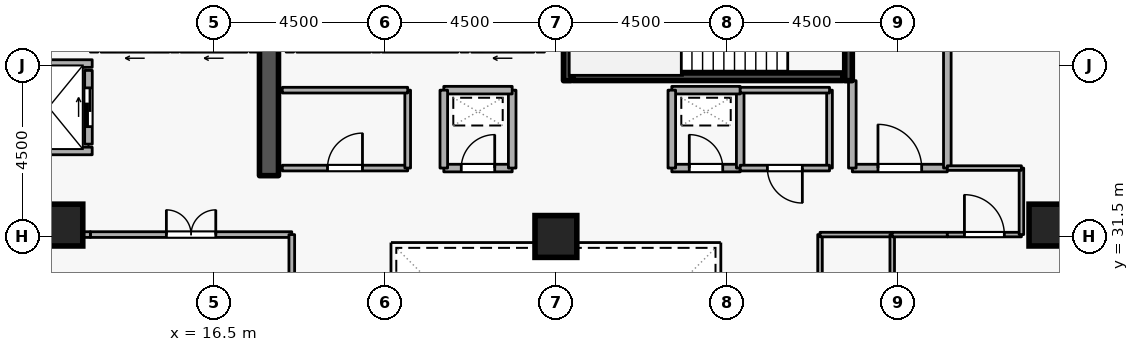
"""IFC4 building model, lengths in metres.
Left out: names, types, materials, properties, quantities, classifications, styles, units other than length and angle.
Written with IfcOpenShell. Run it as: python <this file> out.ifc"""

import sys

from ifc_helpers import new_model, si_unit, direction, frame, frame_2d, origin, origin_2d, place, context, subcontext, project, spatial, rectangle, extrude, element, fill, save


model = new_model("IFC4")
c1 = context("Model", 3, precision=1e-05, world=origin(), true_north=direction((0.0, 1.0)))
c2 = subcontext(c1, "Body", "Model", "MODEL_VIEW")
j1 = project(units=[si_unit("LENGTHUNIT", "METRE"), si_unit("PLANEANGLEUNIT", "RADIAN")], contexts=[c1])
p1 = place(None, origin())
s1 = spatial("IfcSite", under=j1, at=p1, CompositionType="ELEMENT")
p2 = place(p1, origin())
s2 = spatial("IfcBuilding", under=s1, at=p2, CompositionType="ELEMENT")
p3 = place(p2, frame((0.0, 0.0, 145.5)))
s3 = spatial("IfcBuildingStorey", under=s2, at=p3, CompositionType="ELEMENT", Elevation=145.5)
p4 = place(p3, frame((17.95, 33.1, 0.0), z_axis=(0.0, 0.0, 1.0), x_axis=(0.0, 1.0, 0.0)))
e1 = element("IfcWall", 1, at=p4, inside=s3, PredefinedType="SHEAR", context=c2, shape_type="SweptSolid", body=[
    extrude(rectangle(XDim=5.8, YDim=0.5, at=frame_2d((2.9, 0.0))), origin(), (0.0, 0.0, 1.0), 3.6),
])
for number, where, z_axis, x_axis in (
    (2, (12.5, 31.8, 0.0), (0.0, 0.0, 1.0), (1.0, 0.0, 0.0)),
    (3, (38.5, 31.8, 0.0), (0.0, 0.0, 1.0), (1.0, 0.0, 0.0)),
    (4, (25.5, 31.5, 0.0), (0.0, 0.0, 1.0), (1.0, 0.0, 0.0)),
):
    element("IfcColumn", number, at=place(p3, frame(where, z_axis=z_axis, x_axis=x_axis)), inside=s3, PredefinedType="COLUMN", context=c2, shape_type="SweptSolid", body=[
        extrude(rectangle(XDim=1.1, YDim=1.1, at=origin_2d()), origin(), (0.0, 0.0, 1.0), 3.6),
    ])
p5 = place(p3, frame((24.92, 36.45, 0.0), z_axis=(0.0, 0.0, 1.0), x_axis=(-1.0, 0.0, 0.0)))
e5 = element("IfcWall", 5, at=p5, inside=s3, PredefinedType="STANDARD", context=c2, shape_type="SweptSolid", body=[
    extrude(rectangle(XDim=1.64, YDim=0.2, at=frame_2d((0.82, 0.0))), origin(), (0.0, 0.0, 1.0), 3.3),
])
p6 = place(p5, frame((0.31, 0.0, 0.0)))
e6 = element("IfcOpeningElement", 6, at=p6, cuts=e5, PredefinedType="OPENING", context=c2, shape_type="SweptSolid", body=[
    extrude(rectangle(XDim=1.02, YDim=2.06, at=frame_2d((0.51, 1.03))), frame((0.0, 0.11, 0.0), z_axis=(0.0, -1.0, 0.0), x_axis=(1.0, 0.0, 0.0)), (0.0, 0.0, 1.0), 0.22),
])
p7 = place(p3, frame((22.92, 36.45, 0.0), z_axis=(0.0, 0.0, 1.0), x_axis=(-1.0, 0.0, 0.0)))
e7 = element("IfcWall", 7, at=p7, inside=s3, PredefinedType="STANDARD", context=c2, shape_type="SweptSolid", body=[
    extrude(rectangle(XDim=1.99, YDim=0.2, at=frame_2d((0.995, 0.0))), origin(), (0.0, 0.0, 1.0), 3.3),
])
p8 = place(p3, frame((20.62, 36.45, 0.0), z_axis=(0.0, 0.0, 1.0), x_axis=(-1.0, 0.0, 0.0)))
e8 = element("IfcWall", 8, at=p8, inside=s3, PredefinedType="STANDARD", context=c2, shape_type="SweptSolid", body=[
    extrude(rectangle(XDim=1.94, YDim=0.2, at=frame_2d((0.97, 0.0))), origin(), (0.0, 0.0, 1.0), 3.3),
])
p9 = place(p3, frame((17.37, 36.45, 0.0), z_axis=(0.0, 0.0, 1.0), x_axis=(-1.0, 0.0, 0.0)))
e9 = element("IfcWall", 9, at=p9, inside=s3, PredefinedType="STANDARD", context=c2, shape_type="SweptSolid", body=[
    extrude(rectangle(XDim=1.74, YDim=0.2, at=frame_2d((0.87, 0.0))), origin(), (0.0, 0.0, 1.0), 3.3),
])
p10 = place(p9, frame((0.36, 0.0, 0.0)))
e10 = element("IfcOpeningElement", 10, at=p10, cuts=e9, PredefinedType="OPENING", context=c2, shape_type="SweptSolid", body=[
    extrude(rectangle(XDim=1.02, YDim=2.06, at=frame_2d((0.51, 1.03))), frame((0.0, 0.11, 0.0), z_axis=(0.0, -1.0, 0.0), x_axis=(1.0, 0.0, 0.0)), (0.0, 0.0, 1.0), 0.22),
])
p11 = place(p3, frame((15.32, 36.45, 0.0), z_axis=(0.0, 0.0, 1.0), x_axis=(-1.0, 0.0, 0.0)))
e11 = element("IfcWall", 11, at=p11, inside=s3, PredefinedType="STANDARD", context=c2, shape_type="SweptSolid", body=[
    extrude(rectangle(XDim=1.79, YDim=0.2, at=frame_2d((0.895, 0.0))), origin(), (0.0, 0.0, 1.0), 3.3),
])
p12 = place(p11, frame((0.385, 0.0, 0.0)))
e12 = element("IfcOpeningElement", 12, at=p12, cuts=e11, PredefinedType="OPENING", context=c2, shape_type="SweptSolid", body=[
    extrude(rectangle(XDim=1.02, YDim=2.06, at=frame_2d((0.51, 1.03))), frame((0.0, 0.11, 0.0), z_axis=(0.0, -1.0, 0.0), x_axis=(1.0, 0.0, 0.0)), (0.0, 0.0, 1.0), 0.22),
])
p13 = place(p3, frame((13.2, 33.93, 0.0), z_axis=(0.0, 0.0, 1.0), x_axis=(0.0, 1.0, 0.0)))
e13 = element("IfcWall", 13, at=p13, inside=s3, PredefinedType="STANDARD", context=c2, shape_type="SweptSolid", body=[
    extrude(rectangle(XDim=1.94, YDim=0.2, at=frame_2d((0.97, 0.0))), origin(), (0.0, 0.0, 1.0), 3.3),
])
p14 = place(p13, frame((0.46, 0.0, 0.0)))
e14 = element("IfcOpeningElement", 14, at=p14, cuts=e13, PredefinedType="OPENING", context=c2, shape_type="SweptSolid", body=[
    extrude(rectangle(XDim=1.02, YDim=2.06, at=frame_2d((0.51, 1.03))), frame((0.0, 0.11, 0.0), z_axis=(0.0, -1.0, 0.0), x_axis=(1.0, 0.0, 0.0)), (0.0, 0.0, 1.0), 0.22),
])
for number, where, z_axis, x_axis in (
    (15, (11.002, 36.05, 0.0), (0.0, 0.0, 1.0), (1.0, 0.0, 0.0)),
    (16, (11.002, 33.75, 0.0), (0.0, 0.0, 1.0), (1.0, 0.0, 0.0)),
):
    element("IfcWall", number, at=place(p3, frame(where, z_axis=z_axis, x_axis=x_axis)), inside=s3, PredefinedType="STANDARD", context=c2, shape_type="SweptSolid", body=[
        extrude(rectangle(XDim=2.296, YDim=0.2, at=frame_2d((1.148, 0.0))), origin(), (0.0, 0.0, 1.0), 3.3),
    ])
p15 = place(p3, frame((33.2, 38.95, 0.0), z_axis=(0.0, 0.0, 1.0), x_axis=(0.0, -1.0, 0.0)))
e17 = element("IfcWall", 17, at=p15, inside=s3, PredefinedType="SHEAR", context=c2, shape_type="SweptSolid", body=[
    extrude(rectangle(XDim=3.35, YDim=0.2, at=frame_2d((1.675, 0.0))), origin(), (0.0, 0.0, 1.0), 3.6),
])
p16 = place(p15, frame((1.125, 0.0, 0.0)))
e18 = element("IfcOpeningElement", 18, at=p16, cuts=e17, PredefinedType="OPENING", context=c2, shape_type="SweptSolid", body=[
    extrude(rectangle(XDim=1.1, YDim=2.1, at=frame_2d((0.55, 1.05))), frame((0.0, 0.11, 0.0), z_axis=(0.0, -1.0, 0.0), x_axis=(1.0, 0.0, 0.0)), (0.0, 0.0, 1.0), 0.22),
])
p17 = place(p3, frame((25.8, 35.6, 0.0), z_axis=(0.0, 0.0, 1.0), x_axis=(0.0, 1.0, 0.0)))
e19 = element("IfcWall", 19, at=p17, inside=s3, PredefinedType="SHEAR", context=c2, shape_type="SweptSolid", body=[
    extrude(rectangle(XDim=3.35, YDim=0.2, at=frame_2d((1.675, 0.0))), origin(), (0.0, 0.0, 1.0), 3.6),
])
p18 = place(p3, frame((25.95, 35.703, 0.0), z_axis=(0.0, 0.0, 1.0), x_axis=(1.0, 0.0, 0.0)))
e20 = element("IfcWall", 20, at=p18, inside=s3, PredefinedType="SHEAR", context=c2, shape_type="SweptSolid", body=[
    extrude(rectangle(XDim=7.1, YDim=0.2, at=frame_2d((3.55, 0.0))), origin(), (0.0, 0.0, 1.0), 3.6),
])
p19 = place(p3, frame((33.3, 33.3, 0.0), z_axis=(0.0, 0.0, 1.0), x_axis=(1.0, 0.0, 0.0)))
e21 = element("IfcWall", 21, at=p19, inside=s3, PredefinedType="STANDARD", context=c2, shape_type="SweptSolid", body=[
    extrude(rectangle(XDim=2.5, YDim=0.2, at=frame_2d((1.25, 0.0))), origin(), (0.0, 0.0, 1.0), 3.3),
])
p20 = place(p19, frame((0.675, 0.0, 0.0)))
e22 = element("IfcOpeningElement", 22, at=p20, cuts=e21, PredefinedType="OPENING", context=c2, shape_type="SweptSolid", body=[
    extrude(rectangle(XDim=1.15, YDim=2.1, at=frame_2d((0.575, 1.05))), frame((0.0, 0.11, 0.0), z_axis=(0.0, -1.0, 0.0), x_axis=(1.0, 0.0, 0.0)), (0.0, 0.0, 1.0), 0.22),
])
p21 = place(p3, frame((35.8, 33.3, 0.0), z_axis=(0.0, 0.0, 1.0), x_axis=(0.0, 1.0, 0.0)))
e23 = element("IfcWall", 23, at=p21, inside=s3, PredefinedType="STANDARD", context=c2, shape_type="SweptSolid", body=[
    extrude(rectangle(XDim=5.7, YDim=0.2, at=frame_2d((2.85, 0.0))), origin(), (0.0, 0.0, 1.0), 3.3),
])
p22 = place(p3, frame((33.3, 35.6, 0.0), z_axis=(0.0, 0.0, 1.0), x_axis=(0.0, -1.0, 0.0)))
e24 = element("IfcWall", 24, at=p22, inside=s3, PredefinedType="STANDARD", context=c2, shape_type="SweptSolid", body=[
    extrude(rectangle(XDim=2.3, YDim=0.2, at=frame_2d((1.15, 0.0))), origin(), (0.0, 0.0, 1.0), 2.505),
])
p23 = place(p3, frame((22.55, 33.3, 0.0), z_axis=(0.0, 0.0, 1.0), x_axis=(1.0, 0.0, 0.0)))
e25 = element("IfcWall", 25, at=p23, inside=s3, PredefinedType="STANDARD", context=c2, shape_type="SweptSolid", body=[
    extrude(rectangle(XDim=1.8, YDim=0.2, at=frame_2d((0.9, 0.0))), origin(), (0.0, 0.0, 1.0), 3.3),
])
p24 = place(p23, frame((0.46, 0.0, 0.0)))
e26 = element("IfcOpeningElement", 26, at=p24, cuts=e25, PredefinedType="OPENING", context=c2, shape_type="SweptSolid", body=[
    extrude(rectangle(XDim=0.88, YDim=2.04, at=frame_2d((0.44, 1.02))), frame((0.0, 0.11, 0.0), z_axis=(0.0, -1.0, 0.0), x_axis=(1.0, 0.0, 0.0)), (0.0, 0.0, 1.0), 0.22),
])
p25 = place(p3, frame((24.35, 33.3, 0.0), z_axis=(0.0, 0.0, 1.0), x_axis=(0.0, 1.0, 0.0)))
e27 = element("IfcWall", 27, at=p25, inside=s3, PredefinedType="STANDARD", context=c2, shape_type="SweptSolid", body=[
    extrude(rectangle(XDim=2.05, YDim=0.2, at=frame_2d((1.025, 0.0))), origin(), (0.0, 0.0, 1.0), 3.3),
])
p26 = place(p3, frame((24.35, 35.35, 0.0), z_axis=(0.0, 0.0, 1.0), x_axis=(-1.0, 0.0, 0.0)))
e28 = element("IfcWall", 28, at=p26, inside=s3, PredefinedType="STANDARD", context=c2, shape_type="SweptSolid", body=[
    extrude(rectangle(XDim=1.8, YDim=0.2, at=frame_2d((0.9, 0.0))), origin(), (0.0, 0.0, 1.0), 3.3),
])
p27 = place(p3, frame((22.55, 35.35, 0.0), z_axis=(0.0, 0.0, 1.0), x_axis=(0.0, -1.0, 0.0)))
e29 = element("IfcWall", 29, at=p27, inside=s3, PredefinedType="STANDARD", context=c2, shape_type="SweptSolid", body=[
    extrude(rectangle(XDim=2.05, YDim=0.2, at=frame_2d((1.025, 0.0))), origin(), (0.0, 0.0, 1.0), 3.3),
])
p28 = place(p3, frame((28.55, 33.3, 0.0), z_axis=(0.0, 0.0, 1.0), x_axis=(1.0, 0.0, 0.0)))
e30 = element("IfcWall", 30, at=p28, inside=s3, PredefinedType="STANDARD", context=c2, shape_type="SweptSolid", body=[
    extrude(rectangle(XDim=1.8, YDim=0.2, at=frame_2d((0.9, 0.0))), origin(), (0.0, 0.0, 1.0), 3.3),
])
p29 = place(p28, frame((0.46, 0.0, 0.0)))
e31 = element("IfcOpeningElement", 31, at=p29, cuts=e30, PredefinedType="OPENING", context=c2, shape_type="SweptSolid", body=[
    extrude(rectangle(XDim=0.88, YDim=2.04, at=frame_2d((0.44, 1.02))), frame((0.0, 0.11, 0.0), z_axis=(0.0, -1.0, 0.0), x_axis=(1.0, 0.0, 0.0)), (0.0, 0.0, 1.0), 0.22),
])
p30 = place(p3, frame((30.35, 33.3, 0.0), z_axis=(0.0, 0.0, 1.0), x_axis=(0.0, 1.0, 0.0)))
e32 = element("IfcWall", 32, at=p30, inside=s3, PredefinedType="STANDARD", context=c2, shape_type="SweptSolid", body=[
    extrude(rectangle(XDim=2.05, YDim=0.2, at=frame_2d((1.025, 0.0))), origin(), (0.0, 0.0, 1.0), 3.3),
])
p31 = place(p3, frame((30.35, 35.35, 0.0), z_axis=(0.0, 0.0, 1.0), x_axis=(-1.0, 0.0, 0.0)))
e33 = element("IfcWall", 33, at=p31, inside=s3, PredefinedType="STANDARD", context=c2, shape_type="SweptSolid", body=[
    extrude(rectangle(XDim=1.8, YDim=0.2, at=frame_2d((0.9, 0.0))), origin(), (0.0, 0.0, 1.0), 3.3),
])
p32 = place(p3, frame((28.55, 35.35, 0.0), z_axis=(0.0, 0.0, 1.0), x_axis=(0.0, -1.0, 0.0)))
e34 = element("IfcWall", 34, at=p32, inside=s3, PredefinedType="STANDARD", context=c2, shape_type="SweptSolid", body=[
    extrude(rectangle(XDim=2.05, YDim=0.2, at=frame_2d((1.025, 0.0))), origin(), (0.0, 0.0, 1.0), 3.3),
])
p33 = place(p3, frame((18.3, 33.3, 0.0), z_axis=(0.0, 0.0, 1.0), x_axis=(1.0, 0.0, 0.0)))
e35 = element("IfcWall", 35, at=p33, inside=s3, PredefinedType="PARTITIONING", context=c2, shape_type="SweptSolid", body=[
    extrude(rectangle(XDim=3.3, YDim=0.15, at=frame_2d((1.65, 0.0))), origin(), (0.0, 0.0, 1.0), 3.3),
])
p34 = place(p33, frame((1.19, 0.0, 0.0)))
e36 = element("IfcOpeningElement", 36, at=p34, cuts=e35, PredefinedType="OPENING", context=c2, shape_type="SweptSolid", body=[
    extrude(rectangle(XDim=0.92, YDim=2.08, at=frame_2d((0.46, 1.04))), frame((0.0, 0.085, 0.0), z_axis=(0.0, -1.0, 0.0), x_axis=(1.0, 0.0, 0.0)), (0.0, 0.0, 1.0), 0.17),
])
p35 = place(p3, frame((21.6, 33.3, 0.0), z_axis=(0.0, 0.0, 1.0), x_axis=(0.0, 1.0, 0.0)))
e37 = element("IfcWall", 37, at=p35, inside=s3, PredefinedType="PARTITIONING", context=c2, shape_type="SweptSolid", body=[
    extrude(rectangle(XDim=2.05, YDim=0.15, at=frame_2d((1.025, 0.0))), origin(), (0.0, 0.0, 1.0), 3.3),
])
p36 = place(p3, frame((21.6, 35.35, 0.0), z_axis=(0.0, 0.0, 1.0), x_axis=(-1.0, 0.0, 0.0)))
e38 = element("IfcWall", 38, at=p36, inside=s3, PredefinedType="PARTITIONING", context=c2, shape_type="SweptSolid", body=[
    extrude(rectangle(XDim=3.3, YDim=0.15, at=frame_2d((1.65, 0.0))), origin(), (0.0, 0.0, 1.0), 3.3),
])
p37 = place(p3, frame((32.7, 35.35, 0.0), z_axis=(0.0, 0.0, 1.0), x_axis=(0.0, -1.0, 0.0)))
e39 = element("IfcWall", 39, at=p37, inside=s3, PredefinedType="PARTITIONING", context=c2, shape_type="SweptSolid", body=[
    extrude(rectangle(XDim=2.05, YDim=0.15, at=frame_2d((1.025, 0.0))), origin(), (0.0, 0.0, 1.0), 2.505),
])
p38 = place(p3, frame((32.7, 33.3, 0.0), z_axis=(0.0, 0.0, 1.0), x_axis=(-1.0, 0.0, 0.0)))
e40 = element("IfcWall", 40, at=p38, inside=s3, PredefinedType="PARTITIONING", context=c2, shape_type="SweptSolid", body=[
    extrude(rectangle(XDim=2.35, YDim=0.15, at=frame_2d((1.175, 0.0))), origin(), (0.0, 0.0, 1.0), 3.3),
])
p39 = place(p38, frame((0.715, 0.0, 0.0)))
e41 = element("IfcOpeningElement", 41, at=p39, cuts=e40, PredefinedType="OPENING", context=c2, shape_type="SweptSolid", body=[
    extrude(rectangle(XDim=0.92, YDim=2.08, at=frame_2d((0.46, 1.04))), frame((0.0, 0.085, 0.0), z_axis=(0.0, -1.0, 0.0), x_axis=(1.0, 0.0, 0.0)), (0.0, 0.0, 1.0), 0.17),
])
p40 = place(p3, frame((30.35, 35.35, 0.0), z_axis=(0.0, 0.0, 1.0), x_axis=(1.0, 0.0, 0.0)))
e42 = element("IfcWall", 42, at=p40, inside=s3, PredefinedType="PARTITIONING", context=c2, shape_type="SweptSolid", body=[
    extrude(rectangle(XDim=2.35, YDim=0.15, at=frame_2d((1.175, 0.0))), origin(), (0.0, 0.0, 1.0), 3.3),
])
p41 = place(p3, frame((13.25, 31.55, 0.0), z_axis=(0.0, 0.0, 1.0), x_axis=(1.0, 0.0, 0.0)))
e43 = element("IfcWall", 43, at=p41, inside=s3, PredefinedType="PARTITIONING", context=c2, shape_type="SweptSolid", body=[
    extrude(rectangle(XDim=5.3, YDim=0.15, at=frame_2d((2.65, 0.0))), origin(), (0.0, 0.0, 1.0), 3.3),
])
p42 = place(p41, frame((2.0, 0.0, 0.0)))
e44 = element("IfcOpeningElement", 44, at=p42, cuts=e43, PredefinedType="OPENING", context=c2, shape_type="SweptSolid", body=[
    extrude(rectangle(XDim=1.3, YDim=2.12, at=frame_2d((0.65, 1.06))), frame((0.0, 0.085, 0.0), z_axis=(0.0, -1.0, 0.0), x_axis=(1.0, 0.0, 0.0)), (0.0, 0.0, 1.0), 0.17),
])
p43 = place(p3, frame((18.55, 31.55, 0.0), z_axis=(0.0, 0.0, 1.0), x_axis=(0.0, -1.0, 0.0)))
e45 = element("IfcWall", 45, at=p43, inside=s3, PredefinedType="PARTITIONING", context=c2, shape_type="SweptSolid", body=[
    extrude(rectangle(XDim=2.25, YDim=0.15, at=frame_2d((1.125, 0.0))), origin(), (0.0, 0.0, 1.0), 3.3),
])
p44 = place(p3, frame((10.9, 31.55, 0.0), z_axis=(0.0, 0.0, 1.0), x_axis=(1.0, 0.0, 0.0)))
e46 = element("IfcWall", 46, at=p44, inside=s3, PredefinedType="PARTITIONING", context=c2, shape_type="SweptSolid", body=[
    extrude(rectangle(XDim=2.35, YDim=0.15, at=frame_2d((1.175, 0.0))), origin(), (0.0, 0.0, 1.0), 3.3),
])
p45 = place(p3, frame((32.45, 27.0, 0.0), z_axis=(0.0, 0.0, 1.0), x_axis=(0.0, 1.0, 0.0)))
e47 = element("IfcWall", 47, at=p45, inside=s3, PredefinedType="PARTITIONING", context=c2, shape_type="SweptSolid", body=[
    extrude(rectangle(XDim=4.55, YDim=0.12, at=frame_2d((2.275, 0.0))), origin(), (0.0, 0.0, 1.0), 3.3),
])
p46 = place(p45, frame((1.8, 0.0, 0.0)))
e48 = element("IfcOpeningElement", 48, at=p46, cuts=e47, PredefinedType="OPENING", context=c2, shape_type="SweptSolid", body=[
    extrude(rectangle(XDim=0.95, YDim=2.1, at=frame_2d((0.475, 1.05))), frame((0.0, 0.07, 0.0), z_axis=(0.0, -1.0, 0.0), x_axis=(1.0, 0.0, 0.0)), (0.0, 0.0, 1.0), 0.14),
])
p47 = place(p3, frame((32.45, 31.55, 0.0), z_axis=(0.0, 0.0, 1.0), x_axis=(1.0, 0.0, 0.0)))
e49 = element("IfcWall", 49, at=p47, inside=s3, PredefinedType="PARTITIONING", context=c2, shape_type="SweptSolid", body=[
    extrude(rectangle(XDim=1.9, YDim=0.12, at=frame_2d((0.95, 0.0))), origin(), (0.0, 0.0, 1.0), 3.3),
])
p48 = place(p3, frame((34.35, 31.55, 0.0), z_axis=(0.0, 0.0, 1.0), x_axis=(0.0, -1.0, 0.0)))
e50 = element("IfcWall", 50, at=p48, inside=s3, PredefinedType="PARTITIONING", context=c2, shape_type="SweptSolid", body=[
    extrude(rectangle(XDim=4.55, YDim=0.12, at=frame_2d((2.275, 0.0))), origin(), (0.0, 0.0, 1.0), 3.3),
])
p49 = place(p3, frame((34.35, 31.55, 0.0), z_axis=(0.0, 0.0, 1.0), x_axis=(1.0, 0.0, 0.0)))
e51 = element("IfcWall", 51, at=p49, inside=s3, PredefinedType="PARTITIONING", context=c2, shape_type="SweptSolid", body=[
    extrude(rectangle(XDim=1.45, YDim=0.12, at=frame_2d((0.725, 0.0))), origin(), (0.0, 0.0, 1.0), 3.3),
])
p50 = place(p3, frame((35.8, 31.55, 0.0), z_axis=(0.0, 0.0, 1.0), x_axis=(1.0, 0.0, 0.0)))
e52 = element("IfcWall", 52, at=p50, inside=s3, PredefinedType="PARTITIONING", context=c2, shape_type="SweptSolid", body=[
    extrude(rectangle(XDim=1.95, YDim=0.12, at=frame_2d((0.975, 0.0))), origin(), (0.0, 0.0, 1.0), 3.3),
])
p51 = place(p50, frame((0.45, 0.0, 0.0)))
e53 = element("IfcOpeningElement", 53, at=p51, cuts=e52, PredefinedType="OPENING", context=c2, shape_type="SweptSolid", body=[
    extrude(rectangle(XDim=1.05, YDim=2.1, at=frame_2d((0.525, 1.05))), frame((0.0, 0.07, 0.0), z_axis=(0.0, -1.0, 0.0), x_axis=(1.0, 0.0, 0.0)), (0.0, 0.0, 1.0), 0.14),
])
p52 = place(p3, frame((37.75, 31.55, 0.0), z_axis=(0.0, 0.0, 1.0), x_axis=(0.0, 1.0, 0.0)))
e54 = element("IfcWall", 54, at=p52, inside=s3, PredefinedType="PARTITIONING", context=c2, shape_type="SweptSolid", body=[
    extrude(rectangle(XDim=1.75, YDim=0.12, at=frame_2d((0.875, 0.0))), origin(), (0.0, 0.0, 1.0), 3.3),
])
p53 = place(p3, frame((37.75, 33.3, 0.0), z_axis=(0.0, 0.0, 1.0), x_axis=(-1.0, 0.0, 0.0)))
e55 = element("IfcWall", 55, at=p53, inside=s3, PredefinedType="PARTITIONING", context=c2, shape_type="SweptSolid", body=[
    extrude(rectangle(XDim=1.95, YDim=0.12, at=frame_2d((0.975, 0.0))), origin(), (0.0, 0.0, 1.0), 3.3),
])
p54 = place(p14, origin())
e56 = element("IfcDoor", 56, at=p54, inside=s3, OperationType="SLIDING_TO_LEFT", PredefinedType="DOOR", context=c2, shape_type="SweptSolid", body=[
    extrude(rectangle(XDim=1.02, YDim=2.06, at=frame_2d((0.51, 1.03))), frame((0.0, 0.025, 0.0), z_axis=(0.0, -1.0, 0.0), x_axis=(1.0, 0.0, 0.0)), (0.0, 0.0, 1.0), 0.05),
])
fill(e14, e56)
p55 = place(p20, origin())
e57 = element("IfcDoor", 57, at=p55, inside=s3, OperationType="SINGLE_SWING_LEFT", PredefinedType="DOOR", context=c2, shape_type="SweptSolid", body=[
    extrude(rectangle(XDim=1.15, YDim=2.1, at=frame_2d((0.575, 1.05))), frame((0.0, 0.025, 0.0), z_axis=(0.0, -1.0, 0.0), x_axis=(1.0, 0.0, 0.0)), (0.0, 0.0, 1.0), 0.05),
])
fill(e22, e57)
p56 = place(p24, origin())
e58 = element("IfcDoor", 58, at=p56, inside=s3, OperationType="SINGLE_SWING_RIGHT", PredefinedType="DOOR", context=c2, shape_type="SweptSolid", body=[
    extrude(rectangle(XDim=0.88, YDim=2.04, at=frame_2d((0.44, 1.02))), frame((0.0, 0.025, 0.0), z_axis=(0.0, -1.0, 0.0), x_axis=(1.0, 0.0, 0.0)), (0.0, 0.0, 1.0), 0.05),
])
fill(e26, e58)
p57 = place(p29, origin())
e59 = element("IfcDoor", 59, at=p57, inside=s3, OperationType="SINGLE_SWING_LEFT", PredefinedType="DOOR", context=c2, shape_type="SweptSolid", body=[
    extrude(rectangle(XDim=0.88, YDim=2.04, at=frame_2d((0.44, 1.02))), frame((0.0, 0.025, 0.0), z_axis=(0.0, -1.0, 0.0), x_axis=(1.0, 0.0, 0.0)), (0.0, 0.0, 1.0), 0.05),
])
fill(e31, e59)
p58 = place(p34, origin())
e60 = element("IfcDoor", 60, at=p58, inside=s3, OperationType="SINGLE_SWING_RIGHT", PredefinedType="DOOR", context=c2, shape_type="SweptSolid", body=[
    extrude(rectangle(XDim=0.92, YDim=2.08, at=frame_2d((0.46, 1.04))), frame((0.0, 0.025, 0.0), z_axis=(0.0, -1.0, 0.0), x_axis=(1.0, 0.0, 0.0)), (0.0, 0.0, 1.0), 0.05),
])
fill(e36, e60)
p59 = place(p39, origin())
e61 = element("IfcDoor", 61, at=p59, inside=s3, OperationType="SINGLE_SWING_LEFT", PredefinedType="DOOR", context=c2, shape_type="SweptSolid", body=[
    extrude(rectangle(XDim=0.92, YDim=2.08, at=frame_2d((0.46, 1.04))), frame((0.0, 0.025, 0.0), z_axis=(0.0, -1.0, 0.0), x_axis=(1.0, 0.0, 0.0)), (0.0, 0.0, 1.0), 0.05),
])
fill(e41, e61)
p60 = place(p42, origin())
e62 = element("IfcDoor", 62, at=p60, inside=s3, OperationType="DOUBLE_DOOR_SINGLE_SWING", PredefinedType="DOOR", context=c2, shape_type="SweptSolid", body=[
    extrude(rectangle(XDim=1.3, YDim=2.12, at=frame_2d((0.65, 1.06))), frame((0.0, 0.025, 0.0), z_axis=(0.0, -1.0, 0.0), x_axis=(1.0, 0.0, 0.0)), (0.0, 0.0, 1.0), 0.05),
])
fill(e44, e62)
p61 = place(p51, origin())
e63 = element("IfcDoor", 63, at=p61, inside=s3, OperationType="SINGLE_SWING_LEFT", PredefinedType="DOOR", context=c2, shape_type="SweptSolid", body=[
    extrude(rectangle(XDim=1.05, YDim=2.1, at=frame_2d((0.525, 1.05))), frame((0.0, 0.025, 0.0), z_axis=(0.0, -1.0, 0.0), x_axis=(1.0, 0.0, 0.0)), (0.0, 0.0, 1.0), 0.05),
])
fill(e53, e63)
save(model, sys.argv[1])
